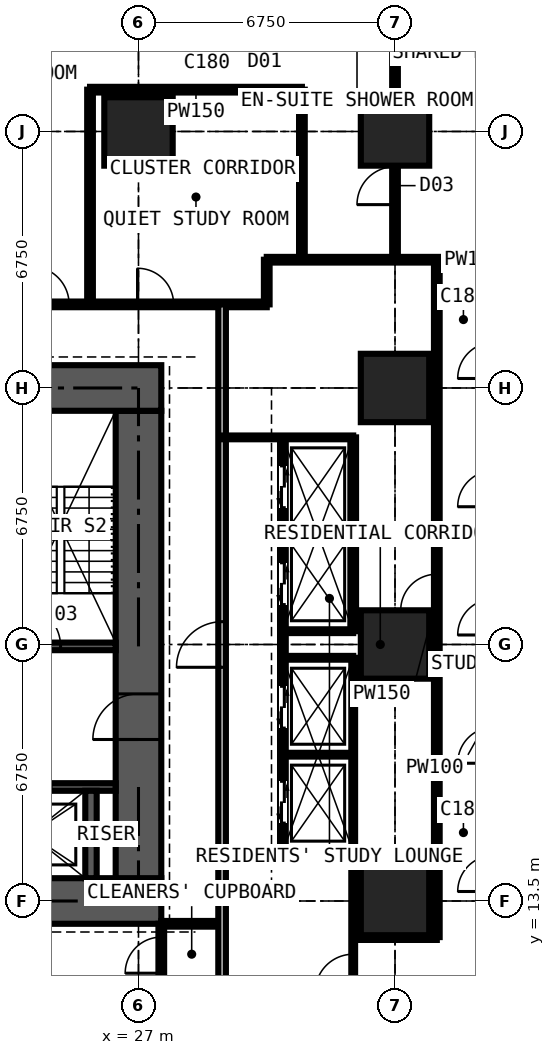
"""IFC4 building model, lengths in metres.
Left out: names, types, materials, properties, quantities, classifications, styles, units other than length and angle.
Written with IfcOpenShell. Run it as: python <this file> out.ifc"""

import sys

from ifc_helpers import new_model, si_unit, direction, frame, frame_2d, origin, origin_2d, place, context, subcontext, project, spatial, rectangle, extrude, element, fill, save


model = new_model("IFC4")
c1 = context("Model", 3, precision=1e-05, world=origin(), true_north=direction((0.0, 1.0)))
c2 = subcontext(c1, "Body", "Model", "MODEL_VIEW")
j1 = project(units=[si_unit("LENGTHUNIT", "METRE"), si_unit("PLANEANGLEUNIT", "RADIAN")], contexts=[c1])
p1 = place(None, origin())
s1 = spatial("IfcSite", under=j1, at=p1, CompositionType="ELEMENT")
p2 = place(p1, origin())
s2 = spatial("IfcBuilding", under=s1, at=p2, CompositionType="ELEMENT")
p3 = place(p2, frame((0.0, 0.0, 57.6)))
s3 = spatial("IfcBuildingStorey", under=s2, at=p3, CompositionType="ELEMENT", Elevation=57.6)
for number, where, z_axis, x_axis in (
    (1, (27.0, 33.75, 0.0), (0.0, 0.0, 1.0), (1.0, 0.0, 0.0)),
    (2, (33.75, 13.5, 0.0), (0.0, 0.0, 1.0), (1.0, 0.0, 0.0)),
    (3, (33.75, 20.25, 0.0), (0.0, 0.0, 1.0), (1.0, 0.0, 0.0)),
    (4, (33.75, 27.0, 0.0), (0.0, 0.0, 1.0), (1.0, 0.0, 0.0)),
    (5, (33.75, 33.75, 0.0), (0.0, 0.0, 1.0), (1.0, 0.0, 0.0)),
):
    element("IfcColumn", number, at=place(p3, frame(where, z_axis=z_axis, x_axis=x_axis)), inside=s3, PredefinedType="COLUMN", context=c2, shape_type="SweptSolid", body=[
        extrude(rectangle(XDim=1.8, YDim=1.8, at=origin_2d()), origin(), (0.0, 0.0, 1.0), 3.6),
    ])
p4 = place(p3, frame((12.9, 13.5, 0.0), z_axis=(0.0, 0.0, 1.0), x_axis=(1.0, 0.0, 0.0)))
e6 = element("IfcWall", 6, at=p4, inside=s3, PredefinedType="SHEAR", context=c2, shape_type="SweptSolid", body=[
    extrude(rectangle(XDim=14.7, YDim=1.2, at=frame_2d((7.35, 0.0))), origin(), (0.0, 0.0, 1.0), 3.6),
])
p5 = place(p3, frame((27.0, 14.1, 0.0), z_axis=(0.0, 0.0, 1.0), x_axis=(0.0, 1.0, 0.0)))
e7 = element("IfcWall", 7, at=p5, inside=s3, PredefinedType="SHEAR", context=c2, shape_type="SweptSolid", body=[
    extrude(rectangle(XDim=12.3, YDim=1.2, at=frame_2d((6.15, 0.0))), origin(), (0.0, 0.0, 1.0), 3.6),
])
p6 = place(p5, frame((3.65, 0.0, 0.0)))
e8 = element("IfcOpeningElement", 8, at=p6, cuts=e7, PredefinedType="OPENING", context=c2, shape_type="SweptSolid", body=[
    extrude(rectangle(XDim=1.2, YDim=2.2, at=frame_2d((0.6, 1.1))), frame((0.0, 0.61, 0.0), z_axis=(0.0, -1.0, 0.0), x_axis=(1.0, 0.0, 0.0)), (0.0, 0.0, 1.0), 1.22),
])
p7 = place(p3, frame((27.6, 27.0, 0.0), z_axis=(0.0, 0.0, 1.0), x_axis=(-1.0, 0.0, 0.0)))
e9 = element("IfcWall", 9, at=p7, inside=s3, PredefinedType="SHEAR", context=c2, shape_type="SweptSolid", body=[
    extrude(rectangle(XDim=14.7, YDim=1.2, at=frame_2d((7.35, 0.0))), origin(), (0.0, 0.0, 1.0), 3.6),
])
p8 = place(p7, frame((5.225, 0.0, 0.0)))
e10 = element("IfcOpeningElement", 10, at=p8, cuts=e9, PredefinedType="OPENING", context=c2, shape_type="SweptSolid", body=[
    extrude(rectangle(XDim=0.9, YDim=2.2, at=frame_2d((0.45, 1.1))), frame((0.0, 0.61, 0.0), z_axis=(0.0, -1.0, 0.0), x_axis=(1.0, 0.0, 0.0)), (0.0, 0.0, 1.0), 1.22),
])
p9 = place(p7, frame((8.2, 0.0, 0.0)))
e11 = element("IfcOpeningElement", 11, at=p9, cuts=e9, PredefinedType="OPENING", context=c2, shape_type="SweptSolid", body=[
    extrude(rectangle(XDim=1.0, YDim=2.2, at=frame_2d((0.5, 1.1))), frame((0.0, 0.61, 0.0), z_axis=(0.0, -1.0, 0.0), x_axis=(1.0, 0.0, 0.0)), (0.0, 0.0, 1.0), 1.22),
])
p10 = place(p3, frame((14.1, 16.5, 0.0), z_axis=(0.0, 0.0, 1.0), x_axis=(1.0, 0.0, 0.0)))
e12 = element("IfcWall", 12, at=p10, inside=s3, PredefinedType="SHEAR", context=c2, shape_type="SweptSolid", body=[
    extrude(rectangle(XDim=12.3, YDim=0.2, at=frame_2d((6.15, 0.0))), origin(), (0.0, 0.0, 1.0), 3.6),
])
p11 = place(p10, frame((0.9, 0.0, 0.0)))
e13 = element("IfcOpeningElement", 13, at=p11, cuts=e12, PredefinedType="OPENING", context=c2, shape_type="SweptSolid", body=[
    extrude(rectangle(XDim=1.1, YDim=2.2, at=frame_2d((0.55, 1.1))), frame((0.0, 0.11, 0.0), z_axis=(0.0, -1.0, 0.0), x_axis=(1.0, 0.0, 0.0)), (0.0, 0.0, 1.0), 0.22),
])
p12 = place(p10, frame((9.5, 0.0, 0.0)))
e14 = element("IfcOpeningElement", 14, at=p12, cuts=e12, PredefinedType="OPENING", context=c2, shape_type="SweptSolid", body=[
    extrude(rectangle(XDim=1.1, YDim=2.2, at=frame_2d((0.55, 1.1))), frame((0.0, 0.11, 0.0), z_axis=(0.0, -1.0, 0.0), x_axis=(1.0, 0.0, 0.0)), (0.0, 0.0, 1.0), 0.22),
])
p13 = place(p3, frame((14.1, 20.2, 0.0), z_axis=(0.0, 0.0, 1.0), x_axis=(1.0, 0.0, 0.0)))
e15 = element("IfcWall", 15, at=p13, inside=s3, PredefinedType="SHEAR", context=c2, shape_type="SweptSolid", body=[
    extrude(rectangle(XDim=12.3, YDim=0.2, at=frame_2d((6.15, 0.0))), origin(), (0.0, 0.0, 1.0), 3.6),
])
p14 = place(p13, frame((0.35, 0.0, 0.0)))
e16 = element("IfcOpeningElement", 16, at=p14, cuts=e15, PredefinedType="OPENING", context=c2, shape_type="SweptSolid", body=[
    extrude(rectangle(XDim=1.1, YDim=2.2, at=frame_2d((0.55, 1.1))), frame((0.0, 0.11, 0.0), z_axis=(0.0, -1.0, 0.0), x_axis=(1.0, 0.0, 0.0)), (0.0, 0.0, 1.0), 0.22),
])
p15 = place(p13, frame((9.75, 0.0, 0.0)))
e17 = element("IfcOpeningElement", 17, at=p15, cuts=e15, PredefinedType="OPENING", context=c2, shape_type="SweptSolid", body=[
    extrude(rectangle(XDim=1.1, YDim=2.2, at=frame_2d((0.55, 1.1))), frame((0.0, 0.11, 0.0), z_axis=(0.0, -1.0, 0.0), x_axis=(1.0, 0.0, 0.0)), (0.0, 0.0, 1.0), 0.22),
])
p16 = place(p3, frame((25.75, 14.1, 0.0), z_axis=(0.0, 0.0, 1.0), x_axis=(0.0, 1.0, 0.0)))
e18 = element("IfcWall", 18, at=p16, inside=s3, PredefinedType="SHEAR", context=c2, shape_type="SweptSolid", body=[
    extrude(rectangle(XDim=2.3, YDim=0.3, at=frame_2d((1.15, 0.0))), origin(), (0.0, 0.0, 1.0), 3.6),
])
p17 = place(p3, frame((11.3, 29.2, 0.0), z_axis=(0.0, 0.0, 1.0), x_axis=(1.0, 0.0, 0.0)))
e19 = element("IfcWall", 19, at=p17, inside=s3, PredefinedType="PARTITIONING", context=c2, shape_type="SweptSolid", body=[
    extrude(rectangle(XDim=19.075, YDim=0.15, at=frame_2d((9.538, 0.0))), origin(), (0.0, 0.0, 1.0), 3.375),
])
p18 = place(p17, frame((12.875, 0.0, 0.0)))
e20 = element("IfcOpeningElement", 20, at=p18, cuts=e19, PredefinedType="OPENING", context=c2, shape_type="SweptSolid", body=[
    extrude(rectangle(XDim=1.0, YDim=2.2, at=frame_2d((0.5, 1.1))), frame((0.0, 0.085, 0.0), z_axis=(0.0, -1.0, 0.0), x_axis=(1.0, 0.0, 0.0)), (0.0, 0.0, 1.0), 0.17),
])
p19 = place(p17, frame((10.438, 0.0, 0.0)))
e21 = element("IfcOpeningElement", 21, at=p19, cuts=e19, PredefinedType="OPENING", context=c2, shape_type="SweptSolid", body=[
    extrude(rectangle(XDim=1.0, YDim=2.2, at=frame_2d((0.5, 1.1))), frame((0.0, 0.085, 0.0), z_axis=(0.0, -1.0, 0.0), x_axis=(1.0, 0.0, 0.0)), (0.0, 0.0, 1.0), 0.17),
])
p20 = place(p17, frame((15.675, 0.0, 0.0)))
e22 = element("IfcOpeningElement", 22, at=p20, cuts=e19, PredefinedType="OPENING", context=c2, shape_type="SweptSolid", body=[
    extrude(rectangle(XDim=0.95, YDim=2.2, at=frame_2d((0.475, 1.1))), frame((0.0, 0.085, 0.0), z_axis=(0.0, -1.0, 0.0), x_axis=(1.0, 0.0, 0.0)), (0.0, 0.0, 1.0), 0.17),
])
p21 = place(p3, frame((25.725, 29.2, 0.0), z_axis=(0.0, 0.0, 1.0), x_axis=(0.0, 1.0, 0.0)))
e23 = element("IfcWall", 23, at=p21, inside=s3, PredefinedType="PARTITIONING", context=c2, shape_type="SweptSolid", body=[
    extrude(rectangle(XDim=5.65, YDim=0.15, at=frame_2d((2.825, 0.0))), origin(), (0.0, 0.0, 1.0), 3.375),
])
p22 = place(p3, frame((25.725, 34.85, 0.0), z_axis=(0.0, 0.0, 1.0), x_axis=(1.0, 0.0, 0.0)))
e24 = element("IfcWall", 24, at=p22, inside=s3, PredefinedType="PARTITIONING", context=c2, shape_type="SweptSolid", body=[
    extrude(rectangle(XDim=5.575, YDim=0.15, at=frame_2d((2.788, 0.0))), origin(), (0.0, 0.0, 1.0), 3.375),
])
p23 = place(p3, frame((27.6, 11.3, 0.0), z_axis=(0.0, 0.0, 1.0), x_axis=(0.0, 1.0, 0.0)))
e25 = element("IfcWall", 25, at=p23, inside=s3, PredefinedType="PARTITIONING", context=c2, shape_type="SweptSolid", body=[
    extrude(rectangle(XDim=1.6, YDim=0.15, at=frame_2d((0.8, 0.0))), origin(), (0.0, 0.0, 1.0), 3.375),
])
p24 = place(p23, frame((0.3, 0.0, 0.0)))
e26 = element("IfcOpeningElement", 26, at=p24, cuts=e25, PredefinedType="OPENING", context=c2, shape_type="SweptSolid", body=[
    extrude(rectangle(XDim=0.95, YDim=2.2, at=frame_2d((0.475, 1.1))), frame((0.0, 0.085, 0.0), z_axis=(0.0, -1.0, 0.0), x_axis=(1.0, 0.0, 0.0)), (0.0, 0.0, 1.0), 0.17),
])
p25 = place(p3, frame((27.6, 12.9, 0.0), z_axis=(0.0, 0.0, 1.0), x_axis=(1.0, 0.0, 0.0)))
e27 = element("IfcWall", 27, at=p25, inside=s3, PredefinedType="PARTITIONING", context=c2, shape_type="SweptSolid", body=[
    extrude(rectangle(XDim=1.6, YDim=0.15, at=frame_2d((0.8, 0.0))), origin(), (0.0, 0.0, 1.0), 2.877),
])
p26 = place(p3, frame((29.2, 11.3, 0.0), z_axis=(0.0, 0.0, 1.0), x_axis=(0.0, 1.0, 0.0)))
e28 = element("IfcWall", 28, at=p26, inside=s3, PredefinedType="PARTITIONING", context=c2, shape_type="SweptSolid", body=[
    extrude(rectangle(XDim=17.9, YDim=0.2, at=frame_2d((8.95, 0.0))), origin(), (0.0, 0.0, 1.0), 3.375),
])
p27 = place(p26, frame((8.35, 0.0, 0.0)))
e29 = element("IfcOpeningElement", 29, at=p27, cuts=e28, PredefinedType="OPENING", context=c2, shape_type="SweptSolid", body=[
    extrude(rectangle(XDim=1.2, YDim=2.2, at=frame_2d((0.6, 1.1))), frame((0.0, 0.11, 0.0), z_axis=(0.0, -1.0, 0.0), x_axis=(1.0, 0.0, 0.0)), (0.0, 0.0, 1.0), 0.22),
])
p28 = place(p3, frame((29.2, 25.7, 0.0), z_axis=(0.0, 0.0, 1.0), x_axis=(1.0, 0.0, 0.0)))
e30 = element("IfcWall", 30, at=p28, inside=s3, PredefinedType="SHEAR", context=c2, shape_type="SweptSolid", body=[
    extrude(rectangle(XDim=3.45, YDim=0.1, at=frame_2d((1.725, 0.0))), origin(), (0.0, 0.0, 1.0), 3.375),
])
p29 = place(p3, frame((30.375, 29.2, 0.0), z_axis=(0.0, 0.0, 1.0), x_axis=(0.0, 1.0, 0.0)))
e31 = element("IfcWall", 31, at=p29, inside=s3, PredefinedType="PARTITIONING", context=c2, shape_type="SweptSolid", body=[
    extrude(rectangle(XDim=1.175, YDim=0.15, at=frame_2d((0.587, 0.0))), origin(), (0.0, 0.0, 1.0), 3.375),
])
p30 = place(p3, frame((30.375, 30.375, 0.0), z_axis=(0.0, 0.0, 1.0), x_axis=(1.0, 0.0, 0.0)))
e32 = element("IfcWall", 32, at=p30, inside=s3, PredefinedType="PARTITIONING", context=c2, shape_type="SweptSolid", body=[
    extrude(rectangle(XDim=10.859, YDim=0.15, at=frame_2d((5.429, 0.0))), origin(), (0.0, 0.0, 1.0), 3.375),
])
p31 = place(p3, frame((30.8, 14.8, 0.0), z_axis=(0.0, 0.0, 1.0), x_axis=(0.0, 1.0, 0.0)))
e33 = element("IfcWall", 33, at=p31, inside=s3, PredefinedType="PARTITIONING", context=c2, shape_type="SweptSolid", body=[
    extrude(rectangle(XDim=10.9, YDim=0.15, at=frame_2d((5.45, 0.0))), origin(), (0.0, 0.0, 1.0), 3.375),
])
p32 = place(p31, frame((0.75, 0.0, 0.0)))
e34 = element("IfcOpeningElement", 34, at=p32, cuts=e33, PredefinedType="OPENING", context=c2, shape_type="SweptSolid", body=[
    extrude(rectangle(XDim=1.1, YDim=2.2, at=frame_2d((0.55, 1.1))), frame((0.0, 0.085, 0.0), z_axis=(0.0, -1.0, 0.0), x_axis=(1.0, 0.0, 0.0)), (0.0, 0.0, 1.0), 0.17),
])
p33 = place(p31, frame((3.25, 0.0, 0.0)))
e35 = element("IfcOpeningElement", 35, at=p33, cuts=e33, PredefinedType="OPENING", context=c2, shape_type="SweptSolid", body=[
    extrude(rectangle(XDim=1.1, YDim=2.2, at=frame_2d((0.55, 1.1))), frame((0.0, 0.085, 0.0), z_axis=(0.0, -1.0, 0.0), x_axis=(1.0, 0.0, 0.0)), (0.0, 0.0, 1.0), 0.17),
])
p34 = place(p31, frame((6.5, 0.0, 0.0)))
e36 = element("IfcOpeningElement", 36, at=p34, cuts=e33, PredefinedType="OPENING", context=c2, shape_type="SweptSolid", body=[
    extrude(rectangle(XDim=1.1, YDim=2.2, at=frame_2d((0.55, 1.1))), frame((0.0, 0.085, 0.0), z_axis=(0.0, -1.0, 0.0), x_axis=(1.0, 0.0, 0.0)), (0.0, 0.0, 1.0), 0.17),
])
p35 = place(p31, frame((9.05, 0.0, 0.0)))
e37 = element("IfcOpeningElement", 37, at=p35, cuts=e33, PredefinedType="OPENING", context=c2, shape_type="SweptSolid", body=[
    extrude(rectangle(XDim=1.1, YDim=2.2, at=frame_2d((0.55, 1.1))), frame((0.0, 0.085, 0.0), z_axis=(0.0, -1.0, 0.0), x_axis=(1.0, 0.0, 0.0)), (0.0, 0.0, 1.0), 0.17),
])
for number, where, z_axis, x_axis in (
    (38, (30.8, 14.8, 0.0), (0.0, 0.0, 1.0), (1.0, 0.0, 0.0)),
    (39, (30.8, 17.35, 0.0), (0.0, 0.0, 1.0), (1.0, 0.0, 0.0)),
    (40, (30.8, 19.9, 0.0), (0.0, 0.0, 1.0), (1.0, 0.0, 0.0)),
    (41, (30.8, 20.6, 0.0), (0.0, 0.0, 1.0), (1.0, 0.0, 0.0)),
    (42, (30.8, 23.15, 0.0), (0.0, 0.0, 1.0), (1.0, 0.0, 0.0)),
):
    element("IfcWall", number, at=place(p3, frame(where, z_axis=z_axis, x_axis=x_axis)), inside=s3, PredefinedType="SHEAR", context=c2, shape_type="SweptSolid", body=[
        extrude(rectangle(XDim=1.85, YDim=0.1, at=frame_2d((0.925, 0.0))), origin(), (0.0, 0.0, 1.0), 3.375),
    ])
p36 = place(p3, frame((31.3, 30.375, 0.0), z_axis=(0.0, 0.0, 1.0), x_axis=(0.0, 1.0, 0.0)))
e43 = element("IfcWall", 43, at=p36, inside=s3, PredefinedType="PARTITIONING", context=c2, shape_type="SweptSolid", body=[
    extrude(rectangle(XDim=4.475, YDim=0.15, at=frame_2d((2.238, 0.0))), origin(), (0.0, 0.0, 1.0), 3.375),
])
p37 = place(p3, frame((32.65, 10.6, 0.0), z_axis=(0.0, 0.0, 1.0), x_axis=(0.0, 1.0, 0.0)))
e44 = element("IfcWall", 44, at=p37, inside=s3, PredefinedType="SHEAR", context=c2, shape_type="SweptSolid", body=[
    extrude(rectangle(XDim=9.3, YDim=0.1, at=frame_2d((4.65, 0.0))), origin(), (0.0, 0.0, 1.0), 3.375),
])
p38 = place(p37, frame((0.5, 0.0, 0.0)))
e45 = element("IfcOpeningElement", 45, at=p38, cuts=e44, PredefinedType="OPENING", context=c2, shape_type="SweptSolid", body=[
    extrude(rectangle(XDim=1.0, YDim=2.2, at=frame_2d((0.5, 1.1))), frame((0.0, 0.06, 0.0), z_axis=(0.0, -1.0, 0.0), x_axis=(1.0, 0.0, 0.0)), (0.0, 0.0, 1.0), 0.12),
])
p39 = place(p3, frame((32.65, 12.55, 0.0), z_axis=(0.0, 0.0, 1.0), x_axis=(1.0, 0.0, 0.0)))
e46 = element("IfcWall", 46, at=p39, inside=s3, PredefinedType="PARTITIONING", context=c2, shape_type="SweptSolid", body=[
    extrude(rectangle(XDim=2.2, YDim=0.15, at=frame_2d((1.1, 0.0))), origin(), (0.0, 0.0, 1.0), 3.375),
])
p40 = place(p3, frame((32.65, 20.6, 0.0), z_axis=(0.0, 0.0, 1.0), x_axis=(0.0, 1.0, 0.0)))
e47 = element("IfcWall", 47, at=p40, inside=s3, PredefinedType="PARTITIONING", context=c2, shape_type="SweptSolid", body=[
    extrude(rectangle(XDim=5.1, YDim=0.15, at=frame_2d((2.55, 0.0))), origin(), (0.0, 0.0, 1.0), 3.375),
])
p41 = place(p3, frame((33.75, 30.375, 0.0), z_axis=(0.0, 0.0, 1.0), x_axis=(0.0, 1.0, 0.0)))
e48 = element("IfcWall", 48, at=p41, inside=s3, PredefinedType="PARTITIONING", context=c2, shape_type="SweptSolid", body=[
    extrude(rectangle(XDim=10.859, YDim=0.15, at=frame_2d((5.429, 0.0))), origin(), (0.0, 0.0, 1.0), 2.877),
])
p42 = place(p41, frame((1.45, 0.0, 0.0)))
e49 = element("IfcOpeningElement", 49, at=p42, cuts=e48, PredefinedType="OPENING", context=c2, shape_type="SweptSolid", body=[
    extrude(rectangle(XDim=1.0, YDim=2.2, at=frame_2d((0.5, 1.1))), frame((0.0, 0.085, 0.0), z_axis=(0.0, -1.0, 0.0), x_axis=(1.0, 0.0, 0.0)), (0.0, 0.0, 1.0), 0.17),
])
p43 = place(p3, frame((34.85, 12.55, 0.0), z_axis=(0.0, 0.0, 1.0), x_axis=(0.0, 1.0, 0.0)))
e50 = element("IfcWall", 50, at=p43, inside=s3, PredefinedType="PARTITIONING", context=c2, shape_type="SweptSolid", body=[
    extrude(rectangle(XDim=17.825, YDim=0.15, at=frame_2d((8.913, 0.0))), origin(), (0.0, 0.0, 1.0), 3.375),
])
p44 = place(p43, frame((8.6, 0.0, 0.0)))
e51 = element("IfcOpeningElement", 51, at=p44, cuts=e50, PredefinedType="OPENING", context=c2, shape_type="SweptSolid", body=[
    extrude(rectangle(XDim=0.95, YDim=2.2, at=frame_2d((0.475, 1.1))), frame((0.0, 0.085, 0.0), z_axis=(0.0, -1.0, 0.0), x_axis=(1.0, 0.0, 0.0)), (0.0, 0.0, 1.0), 0.17),
])
p45 = place(p6, origin())
e52 = element("IfcDoor", 52, at=p45, inside=s3, OperationType="DOUBLE_DOOR_SINGLE_SWING", PredefinedType="DOOR", context=c2, shape_type="SweptSolid", body=[
    extrude(rectangle(XDim=1.2, YDim=2.2, at=frame_2d((0.6, 1.1))), frame((0.0, 0.025, 0.0), z_axis=(0.0, -1.0, 0.0), x_axis=(1.0, 0.0, 0.0)), (0.0, 0.0, 1.0), 0.05),
])
fill(e8, e52)
p46 = place(p15, origin())
e53 = element("IfcDoor", 53, at=p46, inside=s3, OperationType="SINGLE_SWING_LEFT", PredefinedType="DOOR", context=c2, shape_type="SweptSolid", body=[
    extrude(rectangle(XDim=1.1, YDim=2.2, at=frame_2d((0.55, 1.1))), frame((0.0, 0.025, 0.0), z_axis=(0.0, -1.0, 0.0), x_axis=(1.0, 0.0, 0.0)), (0.0, 0.0, 1.0), 0.05),
])
fill(e17, e53)
p47 = place(p24, origin())
e54 = element("IfcDoor", 54, at=p47, inside=s3, OperationType="SINGLE_SWING_LEFT", PredefinedType="DOOR", context=c2, shape_type="SweptSolid", body=[
    extrude(rectangle(XDim=0.95, YDim=2.2, at=frame_2d((0.475, 1.1))), frame((0.0, 0.025, 0.0), z_axis=(0.0, -1.0, 0.0), x_axis=(1.0, 0.0, 0.0)), (0.0, 0.0, 1.0), 0.05),
])
fill(e26, e54)
p48 = place(p38, origin())
e55 = element("IfcDoor", 55, at=p48, inside=s3, OperationType="SINGLE_SWING_LEFT", PredefinedType="DOOR", context=c2, shape_type="SweptSolid", body=[
    extrude(rectangle(XDim=1.0, YDim=2.2, at=frame_2d((0.5, 1.1))), frame((0.0, 0.025, 0.0), z_axis=(0.0, -1.0, 0.0), x_axis=(1.0, 0.0, 0.0)), (0.0, 0.0, 1.0), 0.05),
])
fill(e45, e55)
p49 = place(p44, origin())
e56 = element("IfcDoor", 56, at=p49, inside=s3, OperationType="SINGLE_SWING_LEFT", PredefinedType="DOOR", context=c2, shape_type="SweptSolid", body=[
    extrude(rectangle(XDim=0.95, YDim=2.2, at=frame_2d((0.475, 1.1))), frame((0.0, 0.025, 0.0), z_axis=(0.0, -1.0, 0.0), x_axis=(1.0, 0.0, 0.0)), (0.0, 0.0, 1.0), 0.05),
])
fill(e51, e56)
p50 = place(p42, origin())
e57 = element("IfcDoor", 57, at=p50, inside=s3, OperationType="SINGLE_SWING_LEFT", PredefinedType="DOOR", context=c2, shape_type="SweptSolid", body=[
    extrude(rectangle(XDim=1.0, YDim=2.2, at=frame_2d((0.5, 1.1))), frame((0.0, 0.025, 0.0), z_axis=(0.0, -1.0, 0.0), x_axis=(1.0, 0.0, 0.0)), (0.0, 0.0, 1.0), 0.05),
])
fill(e49, e57)
p51 = place(p18, origin())
e58 = element("IfcDoor", 58, at=p51, inside=s3, OperationType="SINGLE_SWING_LEFT", PredefinedType="DOOR", context=c2, shape_type="SweptSolid", body=[
    extrude(rectangle(XDim=1.0, YDim=2.2, at=frame_2d((0.5, 1.1))), frame((0.0, 0.025, 0.0), z_axis=(0.0, -1.0, 0.0), x_axis=(1.0, 0.0, 0.0)), (0.0, 0.0, 1.0), 0.05),
])
fill(e20, e58)
p52 = place(p20, origin())
e59 = element("IfcDoor", 59, at=p52, inside=s3, OperationType="SINGLE_SWING_LEFT", PredefinedType="DOOR", context=c2, shape_type="SweptSolid", body=[
    extrude(rectangle(XDim=0.95, YDim=2.2, at=frame_2d((0.475, 1.1))), frame((0.0, 0.025, 0.0), z_axis=(0.0, -1.0, 0.0), x_axis=(1.0, 0.0, 0.0)), (0.0, 0.0, 1.0), 0.05),
])
fill(e22, e59)
p53 = place(p32, origin())
e60 = element("IfcDoor", 60, at=p53, inside=s3, OperationType="DOUBLE_DOOR_SLIDING", PredefinedType="DOOR", context=c2, shape_type="SweptSolid", body=[
    extrude(rectangle(XDim=1.1, YDim=2.2, at=frame_2d((0.55, 1.1))), frame((0.0, 0.025, 0.0), z_axis=(0.0, -1.0, 0.0), x_axis=(1.0, 0.0, 0.0)), (0.0, 0.0, 1.0), 0.05),
])
fill(e34, e60)
p54 = place(p33, origin())
e61 = element("IfcDoor", 61, at=p54, inside=s3, OperationType="DOUBLE_DOOR_SLIDING", PredefinedType="DOOR", context=c2, shape_type="SweptSolid", body=[
    extrude(rectangle(XDim=1.1, YDim=2.2, at=frame_2d((0.55, 1.1))), frame((0.0, 0.025, 0.0), z_axis=(0.0, -1.0, 0.0), x_axis=(1.0, 0.0, 0.0)), (0.0, 0.0, 1.0), 0.05),
])
fill(e35, e61)
p55 = place(p34, origin())
e62 = element("IfcDoor", 62, at=p55, inside=s3, OperationType="DOUBLE_DOOR_SLIDING", PredefinedType="DOOR", context=c2, shape_type="SweptSolid", body=[
    extrude(rectangle(XDim=1.1, YDim=2.2, at=frame_2d((0.55, 1.1))), frame((0.0, 0.025, 0.0), z_axis=(0.0, -1.0, 0.0), x_axis=(1.0, 0.0, 0.0)), (0.0, 0.0, 1.0), 0.05),
])
fill(e36, e62)
p56 = place(p35, origin())
e63 = element("IfcDoor", 63, at=p56, inside=s3, OperationType="DOUBLE_DOOR_SLIDING", PredefinedType="DOOR", context=c2, shape_type="SweptSolid", body=[
    extrude(rectangle(XDim=1.1, YDim=2.2, at=frame_2d((0.55, 1.1))), frame((0.0, 0.025, 0.0), z_axis=(0.0, -1.0, 0.0), x_axis=(1.0, 0.0, 0.0)), (0.0, 0.0, 1.0), 0.05),
])
fill(e37, e63)
p57 = place(p27, origin())
e64 = element("IfcDoor", 64, at=p57, inside=s3, OperationType="DOUBLE_DOOR_SINGLE_SWING", PredefinedType="DOOR", context=c2, shape_type="SweptSolid", body=[
    extrude(rectangle(XDim=1.2, YDim=2.2, at=frame_2d((0.6, 1.1))), frame((0.0, 0.025, 0.0), z_axis=(0.0, -1.0, 0.0), x_axis=(1.0, 0.0, 0.0)), (0.0, 0.0, 1.0), 0.05),
])
fill(e29, e64)
save(model, sys.argv[1])
